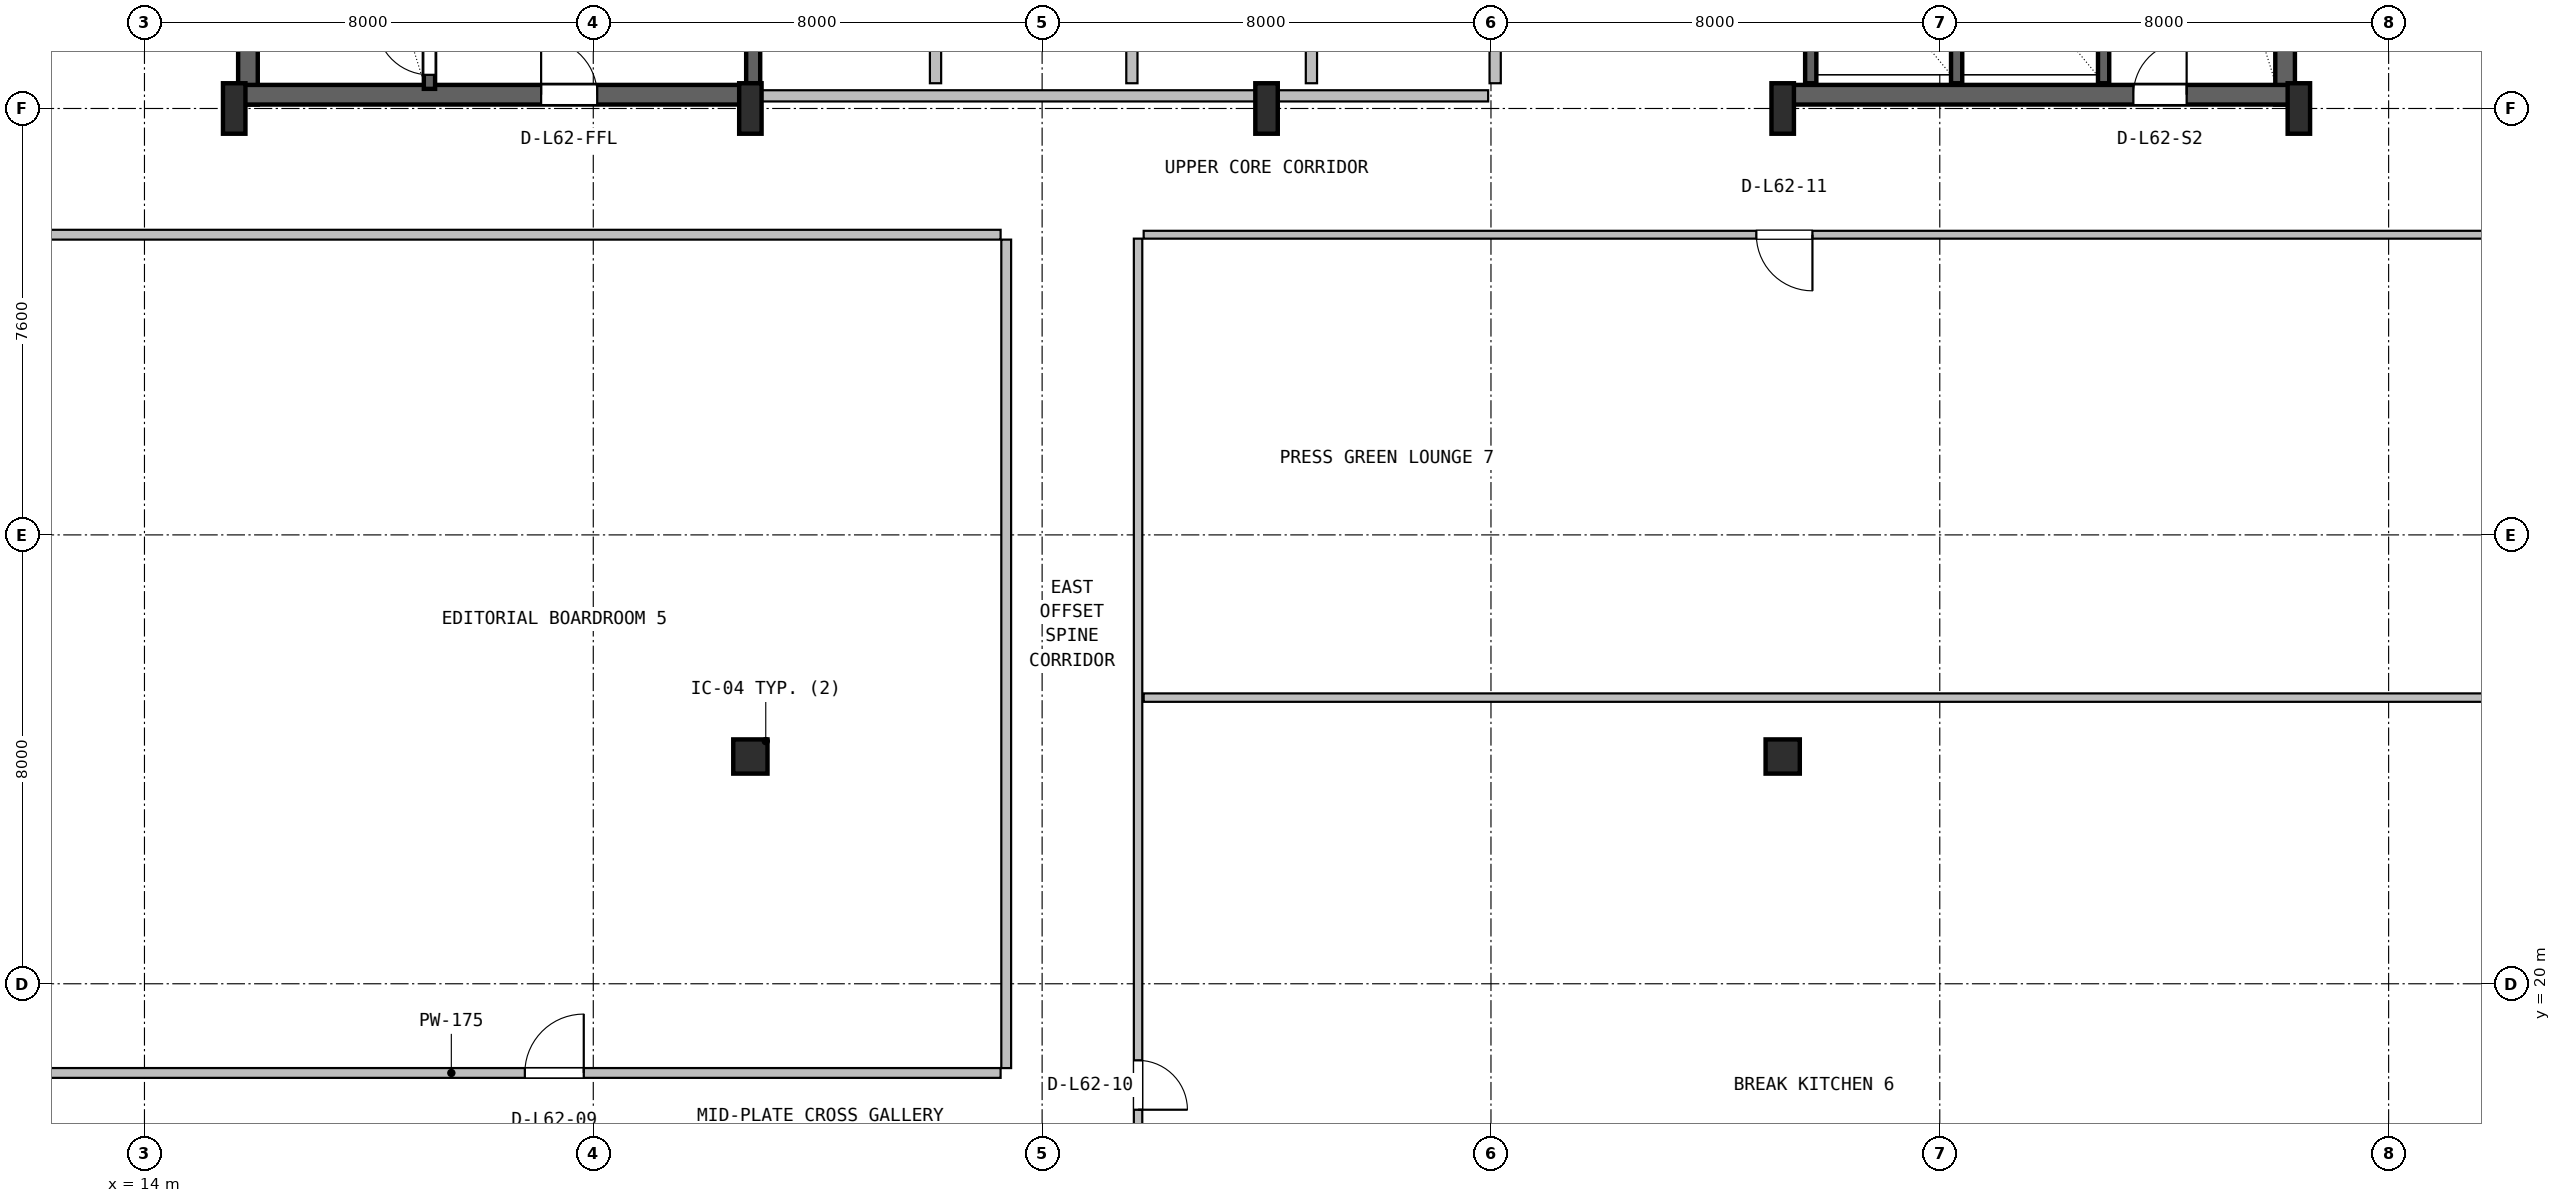
"""IFC4 building model, lengths in metres.
Left out: names, types, materials, properties, quantities, classifications, styles, units other than length and angle.
Written with IfcOpenShell. Run it as: python <this file> out.ifc"""

import sys

from ifc_helpers import new_model, si_unit, direction, frame, frame_2d, origin, origin_2d, place, context, subcontext, project, spatial, rectangle, hollow_circle, i_section, extrude, source, transform, mapped, element, fill, save


model = new_model("IFC4")
c1 = context("Model", 3, precision=1e-05, world=origin(), true_north=direction((0.0, 1.0)))
c2 = subcontext(c1, "Body", "Model", "MODEL_VIEW")
j1 = project(units=[si_unit("LENGTHUNIT", "METRE"), si_unit("PLANEANGLEUNIT", "RADIAN")], contexts=[c1])
p1 = place(None, origin())
s1 = spatial("IfcSite", under=j1, at=p1, CompositionType="ELEMENT")
p2 = place(p1, origin())
s2 = spatial("IfcBuilding", under=s1, at=p2, CompositionType="ELEMENT")
p3 = place(p2, frame((0.0, 0.0, 250.8)))
s3 = spatial("IfcBuildingStorey", under=s2, at=p3, CompositionType="ELEMENT", Elevation=250.8)
for number, where, z_axis, x_axis in (
    (1, (15.845, 35.67, 0.0), (0.0, 0.0, 1.0), (0.0, 1.0, 0.0)),
    (2, (52.155, 35.67, 0.0), (0.0, 0.0, 1.0), (0.0, 1.0, 0.0)),
):
    element("IfcWall", number, at=place(p3, frame(where, z_axis=z_axis, x_axis=x_axis)), inside=s3, PredefinedType="SHEAR", context=c2, shape_type="SweptSolid", body=[
        extrude(rectangle(XDim=11.13, YDim=0.35, at=frame_2d((5.565, 0.0))), origin(), (0.0, 0.0, 1.0), 3.55),
    ])
p4 = place(p3, frame((15.67, 35.845, 0.0), z_axis=(0.0, 0.0, 1.0), x_axis=(1.0, 0.0, 0.0)))
e3 = element("IfcWall", 3, at=p4, inside=s3, PredefinedType="SHEAR", context=c2, shape_type="SweptSolid", body=[
    extrude(rectangle(XDim=9.13, YDim=0.35, at=frame_2d((4.565, 0.0))), origin(), (0.0, 0.0, 1.0), 3.55),
])
p5 = place(p4, frame((5.4, 0.0, 0.0)))
e4 = element("IfcOpeningElement", 4, at=p5, cuts=e3, PredefinedType="OPENING", context=c2, shape_type="SweptSolid", body=[
    extrude(rectangle(XDim=1.0, YDim=2.1, at=frame_2d((0.5, 1.05))), frame((0.0, 0.185, 0.0), z_axis=(0.0, -1.0, 0.0), x_axis=(1.0, 0.0, 0.0)), (0.0, 0.0, 1.0), 0.37),
])
p6 = place(p3, frame((43.2, 35.845, 0.0), z_axis=(0.0, 0.0, 1.0), x_axis=(1.0, 0.0, 0.0)))
e5 = element("IfcWall", 5, at=p6, inside=s3, PredefinedType="SHEAR", context=c2, shape_type="SweptSolid", body=[
    extrude(rectangle(XDim=9.13, YDim=0.35, at=frame_2d((4.565, 0.0))), origin(), (0.0, 0.0, 1.0), 3.55),
])
p7 = place(p6, frame((6.25, 0.0, 0.0)))
e6 = element("IfcOpeningElement", 6, at=p7, cuts=e5, PredefinedType="OPENING", context=c2, shape_type="SweptSolid", body=[
    extrude(rectangle(XDim=0.95, YDim=2.1, at=frame_2d((0.475, 1.05))), frame((0.0, 0.185, 0.0), z_axis=(0.0, -1.0, 0.0), x_axis=(1.0, 0.0, 0.0)), (0.0, 0.0, 1.0), 0.37),
])
m1 = source(origin(), c2, "Body", "SweptSolid", [
    extrude(i_section(OverallWidth=0.4, OverallDepth=0.9, WebThickness=0.016, FlangeThickness=0.028, FilletRadius=0.016, at=origin_2d()), origin(), (0.0, 0.0, 1.0), 3.8),
])
for number, where, z_axis, x_axis in (
    (7, (15.6, 35.6, 0.0), (0.0, 0.0, 1.0), (1.0, 0.0, 0.0)),
    (8, (24.8, 35.6, 0.0), (0.0, 0.0, 1.0), (1.0, 0.0, 0.0)),
    (9, (34.0, 35.6, 0.0), (0.0, 0.0, 1.0), (1.0, 0.0, 0.0)),
    (10, (43.2, 35.6, 0.0), (0.0, 0.0, 1.0), (1.0, 0.0, 0.0)),
    (11, (52.4, 35.6, 0.0), (0.0, 0.0, 1.0), (1.0, 0.0, 0.0)),
):
    element("IfcColumn", number, at=place(p3, frame(where, z_axis=z_axis, x_axis=x_axis)), inside=s3, PredefinedType="COLUMN", context=c2, shape_type="MappedRepresentation", body=[
        mapped(m1, transform((0.0, 0.0, 0.0), x_axis=(1.0, 0.0, 0.0), y_axis=(0.0, 1.0, 0.0), z_axis=(0.0, 0.0, 1.0), scale=1.0)),
    ])
m2 = source(origin(), c2, "Body", "SweptSolid", [
    extrude(hollow_circle(Radius=0.305, WallThickness=0.025, at=origin_2d()), origin(), (0.0, 0.0, 1.0), 3.8),
])
for number, where, z_axis, x_axis in (
    (12, (24.8, 24.05, 0.0), (0.0, 0.0, 1.0), (1.0, 0.0, 0.0)),
    (13, (43.2, 24.05, 0.0), (0.0, 0.0, 1.0), (1.0, 0.0, 0.0)),
):
    element("IfcColumn", number, at=place(p3, frame(where, z_axis=z_axis, x_axis=x_axis)), inside=s3, PredefinedType="COLUMN", context=c2, shape_type="MappedRepresentation", body=[
        mapped(m2, transform((0.0, 0.0, 0.0), x_axis=(1.0, 0.0, 0.0), y_axis=(0.0, 1.0, 0.0), z_axis=(0.0, 0.0, 1.0), scale=1.0)),
    ])
p8 = place(p3, frame((19.08, 35.95, 0.0), z_axis=(0.0, 0.0, 1.0), x_axis=(0.0, 1.0, 0.0)))
e14 = element("IfcWall", 14, at=p8, inside=s3, PredefinedType="SHEAR", context=c2, shape_type="SweptSolid", body=[
    extrude(rectangle(XDim=9.65, YDim=0.2, at=frame_2d((4.825, 0.0))), origin(), (0.0, 0.0, 1.0), 3.55),
])
p9 = place(p8, frame((0.25, 0.0, 0.0)))
e15 = element("IfcOpeningElement", 15, at=p9, cuts=e14, PredefinedType="OPENING", context=c2, shape_type="SweptSolid", body=[
    extrude(rectangle(XDim=0.95, YDim=2.1, at=frame_2d((0.475, 1.05))), frame((0.0, 0.11, 0.0), z_axis=(0.0, -1.0, 0.0), x_axis=(1.0, 0.0, 0.0)), (0.0, 0.0, 1.0), 0.22),
])
p10 = place(p3, frame((24.85, 36.05, 0.0), z_axis=(0.0, 0.0, 1.0), x_axis=(0.0, 1.0, 0.0)))
e16 = element("IfcWall", 16, at=p10, inside=s3, PredefinedType="SHEAR", context=c2, shape_type="SweptSolid", body=[
    extrude(rectangle(XDim=10.45, YDim=0.25, at=frame_2d((5.225, 0.0))), origin(), (0.0, 0.0, 1.0), 3.55),
])
p11 = place(p3, frame((48.92, 36.05, 0.0), z_axis=(0.0, 0.0, 1.0), x_axis=(0.0, 1.0, 0.0)))
e17 = element("IfcWall", 17, at=p11, inside=s3, PredefinedType="SHEAR", context=c2, shape_type="SweptSolid", body=[
    extrude(rectangle(XDim=10.5, YDim=0.2, at=frame_2d((5.25, 0.0))), origin(), (0.0, 0.0, 1.0), 3.55),
])
for number, where, z_axis, x_axis in (
    (18, (43.7, 36.05, 0.0), (0.0, 0.0, 1.0), (0.0, 1.0, 0.0)),
    (19, (46.3, 36.05, 0.0), (0.0, 0.0, 1.0), (0.0, 1.0, 0.0)),
):
    element("IfcWall", number, at=place(p3, frame(where, z_axis=z_axis, x_axis=x_axis)), inside=s3, PredefinedType="SHEAR", context=c2, shape_type="SweptSolid", body=[
        extrude(rectangle(XDim=3.05, YDim=0.2, at=frame_2d((1.525, 0.0))), origin(), (0.0, 0.0, 1.0), 3.55),
    ])
p12 = place(p3, frame((25.0, 35.825, 0.0), z_axis=(0.0, 0.0, 1.0), x_axis=(1.0, 0.0, 0.0)))
e20 = element("IfcWall", 20, at=p12, inside=s3, PredefinedType="SOLIDWALL", context=c2, shape_type="SweptSolid", body=[
    extrude(rectangle(XDim=12.95, YDim=0.2, at=frame_2d((6.475, 0.0))), origin(), (0.0, 0.0, 1.0), 2.575),
])
for number, where, z_axis, x_axis in (
    (21, (28.1, 36.05, 0.0), (0.0, 0.0, 1.0), (0.0, 1.0, 0.0)),
    (22, (31.6, 36.05, 0.0), (0.0, 0.0, 1.0), (0.0, 1.0, 0.0)),
):
    element("IfcWall", number, at=place(p3, frame(where, z_axis=z_axis, x_axis=x_axis)), inside=s3, PredefinedType="PLUMBINGWALL", context=c2, shape_type="SweptSolid", body=[
        extrude(rectangle(XDim=3.1, YDim=0.2, at=frame_2d((1.55, 0.0))), origin(), (0.0, 0.0, 1.0), 3.53),
    ])
for number, where, z_axis, x_axis in (
    (23, (34.8, 36.05, 0.0), (0.0, 0.0, 1.0), (0.0, 1.0, 0.0)),
    (24, (38.075, 36.05, 0.0), (0.0, 0.0, 1.0), (0.0, 1.0, 0.0)),
):
    element("IfcWall", number, at=place(p3, frame(where, z_axis=z_axis, x_axis=x_axis)), inside=s3, PredefinedType="SOLIDWALL", context=c2, shape_type="SweptSolid", body=[
        extrude(rectangle(XDim=3.1, YDim=0.2, at=frame_2d((1.55, 0.0))), origin(), (0.0, 0.0, 1.0), 3.53),
    ])
p13 = place(p3, frame((9.68, 18.41, 0.0), z_axis=(0.0, 0.0, 1.0), x_axis=(1.0, 0.0, 0.0)))
e25 = element("IfcWall", 25, at=p13, inside=s3, PredefinedType="PARTITIONING", context=c2, shape_type="SweptSolid", body=[
    extrude(rectangle(XDim=19.58, YDim=0.175, at=frame_2d((9.79, 0.0))), origin(), (0.0, 0.0, 1.0), 2.908),
])
p14 = place(p13, frame((11.1, 0.0, 0.0)))
e26 = element("IfcOpeningElement", 26, at=p14, cuts=e25, PredefinedType="OPENING", context=c2, shape_type="SweptSolid", body=[
    extrude(rectangle(XDim=1.05, YDim=2.1, at=frame_2d((0.525, 1.05))), frame((0.0, 0.098, 0.0), z_axis=(0.0, -1.0, 0.0), x_axis=(1.0, 0.0, 0.0)), (0.0, 0.0, 1.0), 0.195),
])
p15 = place(p3, frame((29.36, 18.497, 0.0), z_axis=(0.0, 0.0, 1.0), x_axis=(0.0, 1.0, 0.0)))
e27 = element("IfcWall", 27, at=p15, inside=s3, PredefinedType="PARTITIONING", context=c2, shape_type="SweptSolid", body=[
    extrude(rectangle(XDim=14.766, YDim=0.175, at=frame_2d((7.383, 0.0))), origin(), (0.0, 0.0, 1.0), 2.908),
])
p16 = place(p3, frame((9.68, 33.35, 0.0), z_axis=(0.0, 0.0, 1.0), x_axis=(1.0, 0.0, 0.0)))
e28 = element("IfcWall", 28, at=p16, inside=s3, PredefinedType="PARTITIONING", context=c2, shape_type="SweptSolid", body=[
    extrude(rectangle(XDim=19.58, YDim=0.175, at=frame_2d((9.79, 0.0))), origin(), (0.0, 0.0, 1.0), 2.908),
])
p17 = place(p3, frame((31.81, 25.1, 0.0), z_axis=(0.0, 0.0, 1.0), x_axis=(1.0, 0.0, 0.0)))
e29 = element("IfcWall", 29, at=p17, inside=s3, PredefinedType="PARTITIONING", context=c2, shape_type="SweptSolid", body=[
    extrude(rectangle(XDim=26.51, YDim=0.15, at=frame_2d((13.255, 0.0))), origin(), (0.0, 0.0, 1.0), 2.908),
])
p18 = place(p3, frame((31.71, 10.38, 0.0), z_axis=(0.0, 0.0, 1.0), x_axis=(0.0, 1.0, 0.0)))
e30 = element("IfcWall", 30, at=p18, inside=s3, PredefinedType="PARTITIONING", context=c2, shape_type="SweptSolid", body=[
    extrude(rectangle(XDim=22.9, YDim=0.15, at=frame_2d((11.45, 0.0))), origin(), (0.0, 0.0, 1.0), 2.908),
])
p19 = place(p18, frame((7.375, 0.0, 0.0)))
e31 = element("IfcOpeningElement", 31, at=p19, cuts=e30, PredefinedType="OPENING", context=c2, shape_type="SweptSolid", body=[
    extrude(rectangle(XDim=0.88, YDim=2.06, at=frame_2d((0.44, 1.03))), frame((0.0, 0.085, 0.0), z_axis=(0.0, -1.0, 0.0), x_axis=(1.0, 0.0, 0.0)), (0.0, 0.0, 1.0), 0.17),
])
p20 = place(p3, frame((31.81, 33.35, 0.0), z_axis=(0.0, 0.0, 1.0), x_axis=(1.0, 0.0, 0.0)))
e32 = element("IfcWall", 32, at=p20, inside=s3, PredefinedType="PARTITIONING", context=c2, shape_type="SweptSolid", body=[
    extrude(rectangle(XDim=26.51, YDim=0.14, at=frame_2d((13.255, 0.0))), origin(), (0.0, 0.0, 1.0), 2.908),
])
p21 = place(p20, frame((10.92, 0.0, 0.0)))
e33 = element("IfcOpeningElement", 33, at=p21, cuts=e32, PredefinedType="OPENING", context=c2, shape_type="SweptSolid", body=[
    extrude(rectangle(XDim=1.0, YDim=2.1, at=frame_2d((0.5, 1.05))), frame((0.0, 0.08, 0.0), z_axis=(0.0, -1.0, 0.0), x_axis=(1.0, 0.0, 0.0)), (0.0, 0.0, 1.0), 0.16),
])
m3 = source(origin(), c2, "Body", "SweptSolid", [
    extrude(rectangle(XDim=0.95, YDim=2.1, at=frame_2d((0.475, 1.05))), frame((0.0, 0.025, 0.0), z_axis=(0.0, -1.0, 0.0), x_axis=(1.0, 0.0, 0.0)), (0.0, 0.0, 1.0), 0.05),
])
p22 = place(p9, origin())
e34 = element("IfcDoor", 34, at=p22, inside=s3, OperationType="SINGLE_SWING_RIGHT", PredefinedType="DOOR", context=c2, shape_type="MappedRepresentation", body=[
    mapped(m3, transform((0.0, 0.0, 0.0), x_axis=(1.0, 0.0, 0.0), y_axis=(0.0, 1.0, 0.0), z_axis=(0.0, 0.0, 1.0), scale=1.0)),
])
fill(e15, e34)
m4 = source(origin(), c2, "Body", "SweptSolid", [
    extrude(rectangle(XDim=1.0, YDim=2.1, at=frame_2d((0.5, 1.05))), frame((0.0, 0.025, 0.0), z_axis=(0.0, -1.0, 0.0), x_axis=(1.0, 0.0, 0.0)), (0.0, 0.0, 1.0), 0.05),
])
p23 = place(p5, origin())
e35 = element("IfcDoor", 35, at=p23, inside=s3, OperationType="SINGLE_SWING_LEFT", PredefinedType="DOOR", context=c2, shape_type="MappedRepresentation", body=[
    mapped(m4, transform((0.0, 0.0, 0.0), x_axis=(1.0, 0.0, 0.0), y_axis=(0.0, 1.0, 0.0), z_axis=(0.0, 0.0, 1.0), scale=1.0)),
])
fill(e4, e35)
p24 = place(p7, origin())
e36 = element("IfcDoor", 36, at=p24, inside=s3, OperationType="SINGLE_SWING_RIGHT", PredefinedType="DOOR", context=c2, shape_type="MappedRepresentation", body=[
    mapped(m3, transform((0.0, 0.0, 0.0), x_axis=(1.0, 0.0, 0.0), y_axis=(0.0, 1.0, 0.0), z_axis=(0.0, 0.0, 1.0), scale=1.0)),
])
fill(e6, e36)
m5 = source(origin(), c2, "Body", "SweptSolid", [
    extrude(rectangle(XDim=1.05, YDim=2.1, at=frame_2d((0.525, 1.05))), frame((0.0, 0.025, 0.0), z_axis=(0.0, -1.0, 0.0), x_axis=(1.0, 0.0, 0.0)), (0.0, 0.0, 1.0), 0.05),
])
p25 = place(p14, origin())
e37 = element("IfcDoor", 37, at=p25, inside=s3, OperationType="SINGLE_SWING_RIGHT", PredefinedType="DOOR", context=c2, shape_type="MappedRepresentation", body=[
    mapped(m5, transform((0.0, 0.0, 0.0), x_axis=(1.0, 0.0, 0.0), y_axis=(0.0, 1.0, 0.0), z_axis=(0.0, 0.0, 1.0), scale=1.0)),
])
fill(e26, e37)
m6 = source(origin(), c2, "Body", "SweptSolid", [
    extrude(rectangle(XDim=0.88, YDim=2.06, at=frame_2d((0.44, 1.03))), frame((0.0, 0.025, 0.0), z_axis=(0.0, -1.0, 0.0), x_axis=(1.0, 0.0, 0.0)), (0.0, 0.0, 1.0), 0.05),
])
p26 = place(p19, frame((0.88, 0.0, 0.0), z_axis=(0.0, 0.0, 1.0), x_axis=(-1.0, 0.0, 0.0)))
e38 = element("IfcDoor", 38, at=p26, inside=s3, OperationType="SINGLE_SWING_LEFT", PredefinedType="DOOR", context=c2, shape_type="MappedRepresentation", body=[
    mapped(m6, transform((0.0, 0.0, 0.0), x_axis=(1.0, 0.0, 0.0), y_axis=(0.0, 1.0, 0.0), z_axis=(0.0, 0.0, 1.0), scale=1.0)),
])
fill(e31, e38)
m7 = source(origin(), c2, "Body", "SweptSolid", [
    extrude(rectangle(XDim=1.0, YDim=2.1, at=frame_2d((0.5, 1.05))), frame((0.0, 0.025, 0.0), z_axis=(0.0, -1.0, 0.0), x_axis=(1.0, 0.0, 0.0)), (0.0, 0.0, 1.0), 0.05),
])
p27 = place(p21, frame((1.0, 0.0, 0.0), z_axis=(0.0, 0.0, 1.0), x_axis=(-1.0, 0.0, 0.0)))
e39 = element("IfcDoor", 39, at=p27, inside=s3, OperationType="SINGLE_SWING_RIGHT", PredefinedType="DOOR", context=c2, shape_type="MappedRepresentation", body=[
    mapped(m7, transform((0.0, 0.0, 0.0), x_axis=(1.0, 0.0, 0.0), y_axis=(0.0, 1.0, 0.0), z_axis=(0.0, 0.0, 1.0), scale=1.0)),
])
fill(e33, e39)
save(model, sys.argv[1])
